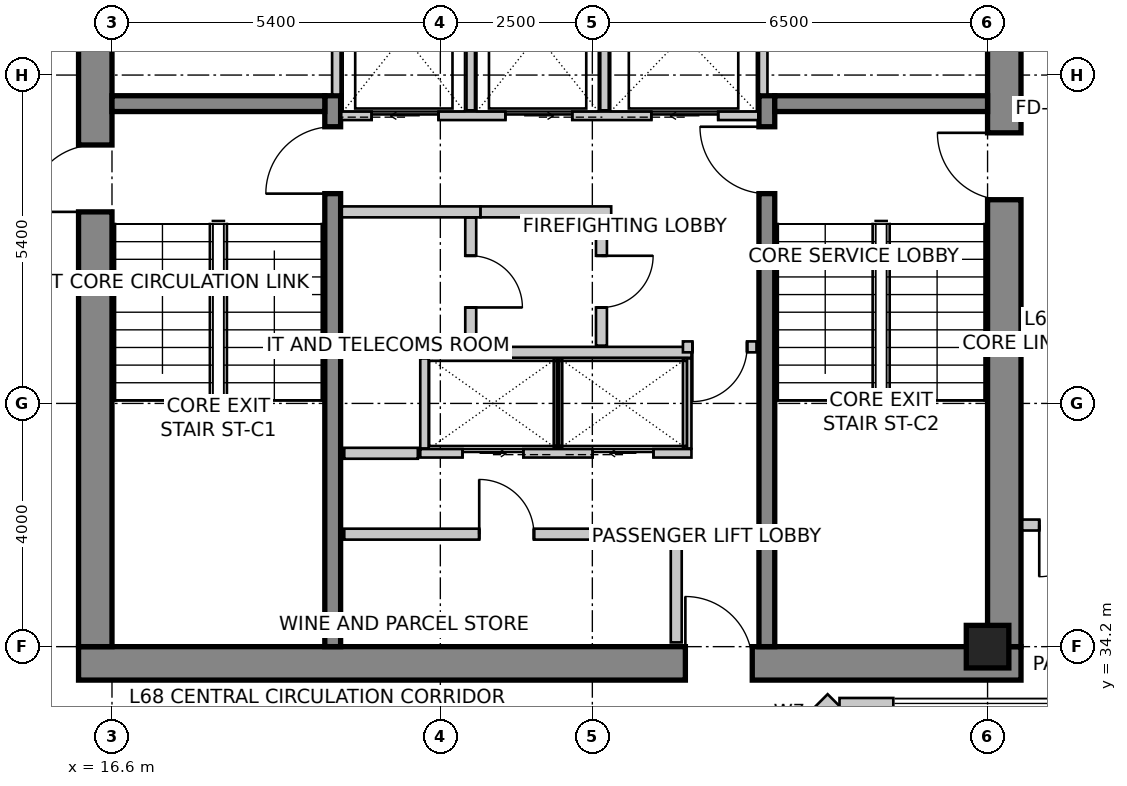
"""IFC4 building model, lengths in metres.
Left out: names, types, materials, properties, quantities, classifications, styles, units other than length and angle.
Written with IfcOpenShell. Run it as: python <this file> out.ifc"""

import sys

from ifc_helpers import new_model, si_unit, direction, frame, frame_2d, origin, origin_2d, place, context, subcontext, project, spatial, rectangle, extrude, source, transform, mapped, element, fill, save


model = new_model("IFC4")
c1 = context("Model", 3, precision=1e-05, world=origin(), true_north=direction((0.0, 1.0)))
c2 = subcontext(c1, "Body", "Model", "MODEL_VIEW")
j1 = project(units=[si_unit("LENGTHUNIT", "METRE"), si_unit("PLANEANGLEUNIT", "RADIAN")], contexts=[c1])
p1 = place(None, origin())
s1 = spatial("IfcSite", under=j1, at=p1, CompositionType="ELEMENT")
p2 = place(p1, origin())
s2 = spatial("IfcBuilding", under=s1, at=p2, CompositionType="ELEMENT")
p3 = place(p2, frame((0.0, 0.0, 267.3)))
s3 = spatial("IfcBuildingStorey", under=s2, at=p3, CompositionType="ELEMENT", Elevation=267.3)
p4 = place(p3, frame((16.05, 33.925, 0.0), z_axis=(0.0, 0.0, 1.0), x_axis=(1.0, 0.0, 0.0)))
e1 = element("IfcWall", 1, at=p4, inside=s3, PredefinedType="SHEAR", context=c2, shape_type="SweptSolid", body=[
    extrude(rectangle(XDim=15.5, YDim=0.55, at=frame_2d((7.75, 0.0))), origin(), (0.0, 0.0, 1.0), 3.6),
])
m1 = source(origin(), c2, "Body", "SweptSolid", [
    extrude(rectangle(XDim=1.1, YDim=2.15, at=frame_2d((0.55, 1.075))), frame((0.0, 0.285, 0.0), z_axis=(0.0, -1.0, 0.0), x_axis=(1.0, 0.0, 0.0)), (0.0, 0.0, 1.0), 0.57),
])
p5 = place(p4, frame((9.98, 0.0, 0.0)))
e2 = element("IfcOpeningElement", 2, at=p5, cuts=e1, PredefinedType="OPENING", context=c2, shape_type="MappedRepresentation", body=[
    mapped(m1, transform((0.0, 0.0, 0.0), scale=1.0)),
])
p6 = place(p3, frame((16.325, 34.2, 0.0), z_axis=(0.0, 0.0, 1.0), x_axis=(0.0, 1.0, 0.0)))
e3 = element("IfcWall", 3, at=p6, inside=s3, PredefinedType="SHEAR", context=c2, shape_type="SweptSolid", body=[
    extrude(rectangle(XDim=11.4, YDim=0.55, at=frame_2d((5.7, 0.0))), origin(), (0.0, 0.0, 1.0), 3.6),
])
p7 = place(p6, frame((7.15, 0.0, 0.0)))
e4 = element("IfcOpeningElement", 4, at=p7, cuts=e3, PredefinedType="OPENING", context=c2, shape_type="MappedRepresentation", body=[
    mapped(m1, transform((0.0, 0.0, 0.0), scale=1.0)),
])
p8 = place(p3, frame((31.275, 34.2, 0.0), z_axis=(0.0, 0.0, 1.0), x_axis=(0.0, 1.0, 0.0)))
e5 = element("IfcWall", 5, at=p8, inside=s3, PredefinedType="SHEAR", context=c2, shape_type="SweptSolid", body=[
    extrude(rectangle(XDim=11.4, YDim=0.55, at=frame_2d((5.7, 0.0))), origin(), (0.0, 0.0, 1.0), 3.6),
])
p9 = place(p8, frame((7.35, 0.0, 0.0)))
e6 = element("IfcOpeningElement", 6, at=p9, cuts=e5, PredefinedType="OPENING", context=c2, shape_type="MappedRepresentation", body=[
    mapped(m1, transform((0.0, 0.0, 0.0), scale=1.0)),
])
p10 = place(p3, frame((20.23, 34.2, 0.0), z_axis=(0.0, 0.0, 1.0), x_axis=(0.0, 1.0, 0.0)))
e7 = element("IfcWall", 7, at=p10, inside=s3, PredefinedType="SHEAR", context=c2, shape_type="SweptSolid", body=[
    extrude(rectangle(XDim=9.06, YDim=0.26, at=frame_2d((4.53, 0.0))), origin(), (0.0, 0.0, 1.0), 3.6),
])
m2 = source(origin(), c2, "Body", "SweptSolid", [
    extrude(rectangle(XDim=1.1, YDim=2.15, at=frame_2d((0.55, 1.075))), frame((0.0, 0.14, 0.0), z_axis=(0.0, -1.0, 0.0), x_axis=(1.0, 0.0, 0.0)), (0.0, 0.0, 1.0), 0.28),
])
p11 = place(p10, frame((7.45, 0.0, 0.0)))
e8 = element("IfcOpeningElement", 8, at=p11, cuts=e7, PredefinedType="OPENING", context=c2, shape_type="MappedRepresentation", body=[
    mapped(m2, transform((0.0, 0.0, 0.0), scale=1.0)),
])
p12 = place(p3, frame((27.37, 34.2, 0.0), z_axis=(0.0, 0.0, 1.0), x_axis=(0.0, 1.0, 0.0)))
e9 = element("IfcWall", 9, at=p12, inside=s3, PredefinedType="SHEAR", context=c2, shape_type="SweptSolid", body=[
    extrude(rectangle(XDim=9.06, YDim=0.26, at=frame_2d((4.53, 0.0))), origin(), (0.0, 0.0, 1.0), 3.6),
])
p13 = place(p12, frame((7.45, 0.0, 0.0)))
e10 = element("IfcOpeningElement", 10, at=p13, cuts=e9, PredefinedType="OPENING", context=c2, shape_type="MappedRepresentation", body=[
    mapped(m2, transform((0.0, 0.0, 0.0), scale=1.0)),
])
for number, where, z_axis, x_axis in (
    (11, (16.6, 43.13, 0.0), (0.0, 0.0, 1.0), (1.0, 0.0, 0.0)),
    (12, (27.5, 43.13, 0.0), (0.0, 0.0, 1.0), (1.0, 0.0, 0.0)),
):
    element("IfcWall", number, at=place(p3, frame(where, z_axis=z_axis, x_axis=x_axis)), inside=s3, PredefinedType="SHEAR", context=c2, shape_type="SweptSolid", body=[
        extrude(rectangle(XDim=3.5, YDim=0.26, at=frame_2d((1.75, 0.0))), origin(), (0.0, 0.0, 1.0), 3.6),
    ])
m3 = source(origin(), c2, "Body", "SweptSolid", [
    extrude(rectangle(XDim=0.7, YDim=0.7, at=origin_2d()), origin(), (0.0, 0.0, 1.0), 3.6),
])
p14 = place(p3, frame((31.0, 34.2, 0.0), z_axis=(0.0, 0.0, 1.0), x_axis=(1.0, 0.0, 0.0)))
e13 = element("IfcColumn", 13, at=p14, inside=s3, PredefinedType="COLUMN", context=c2, shape_type="MappedRepresentation", body=[
    mapped(m3, transform((0.0, 0.0, 0.0), scale=1.0)),
])
p15 = place(p3, frame((26.42, 31.256, 0.0), z_axis=(0.0, 0.0, 1.0), x_axis=(0.707106781187, 0.707106781187, 0.0)))
e14 = element("IfcWall", 14, at=p15, inside=s3, PredefinedType="SOLIDWALL", context=c2, shape_type="SweptSolid", body=[
    extrude(rectangle(XDim=2.907, YDim=0.3, at=frame_2d((1.454, 0.0))), origin(), (0.0, 0.0, 1.0), 3.35),
])
m4 = source(origin(), c2, "Body", "SweptSolid", [
    extrude(rectangle(XDim=0.9, YDim=1.6, at=frame_2d((0.45, 0.8))), frame((0.0, 0.16, 0.0), z_axis=(0.0, -1.0, 0.0), x_axis=(1.0, 0.0, 0.0)), (0.0, 0.0, 1.0), 0.32),
])
p16 = place(p15, frame((1.422, 0.0, 0.85)))
e15 = element("IfcOpeningElement", 15, at=p16, cuts=e14, PredefinedType="OPENING", context=c2, shape_type="MappedRepresentation", body=[
    mapped(m4, transform((0.0, 0.0, 0.0), scale=1.0)),
])
p17 = place(p3, frame((28.565, 33.206, 0.0), z_axis=(0.0, 0.0, 1.0), x_axis=(1.0, 0.0, 0.0)))
e16 = element("IfcWall", 16, at=p17, inside=s3, PredefinedType="SOLIDWALL", context=c2, shape_type="SweptSolid", body=[
    extrude(rectangle(XDim=0.885, YDim=0.3, at=frame_2d((0.442, 0.0))), origin(), (0.0, 0.0, 1.0), 3.35),
])
p18 = place(p3, frame((20.37, 42.93, 0.0), z_axis=(0.0, 0.0, 1.0), x_axis=(1.0, 0.0, 0.0)))
e17 = element("IfcWall", 17, at=p18, inside=s3, PredefinedType="SOLIDWALL", context=c2, shape_type="SweptSolid", body=[
    extrude(rectangle(XDim=6.86, YDim=0.14, at=frame_2d((3.43, 0.0))), origin(), (0.0, 0.0, 1.0), 3.35),
])
m5 = source(origin(), c2, "Body", "SweptSolid", [
    extrude(rectangle(XDim=1.1, YDim=2.15, at=frame_2d((0.55, 1.075))), frame((0.0, 0.08, 0.0), z_axis=(0.0, -1.0, 0.0), x_axis=(1.0, 0.0, 0.0)), (0.0, 0.0, 1.0), 0.16),
])
p19 = place(p18, frame((0.5, 0.0, 0.0)))
e18 = element("IfcOpeningElement", 18, at=p19, cuts=e17, PredefinedType="OPENING", context=c2, shape_type="MappedRepresentation", body=[
    mapped(m5, transform((0.0, 0.0, 0.0), scale=1.0)),
])
p20 = place(p18, frame((2.7, 0.0, 0.0)))
e19 = element("IfcOpeningElement", 19, at=p20, cuts=e17, PredefinedType="OPENING", context=c2, shape_type="MappedRepresentation", body=[
    mapped(m5, transform((0.0, 0.0, 0.0), scale=1.0)),
])
p21 = place(p18, frame((5.1, 0.0, 0.0)))
e20 = element("IfcOpeningElement", 20, at=p21, cuts=e17, PredefinedType="OPENING", context=c2, shape_type="MappedRepresentation", body=[
    mapped(m5, transform((0.0, 0.0, 0.0), scale=1.0)),
])
for number, where, z_axis, x_axis in (
    (21, (20.29, 43.28, 0.0), (0.0, 0.0, 1.0), (0.0, 1.0, 0.0)),
    (22, (27.31, 43.28, 0.0), (0.0, 0.0, 1.0), (0.0, 1.0, 0.0)),
):
    element("IfcWall", number, at=place(p3, frame(where, z_axis=z_axis, x_axis=x_axis)), inside=s3, PredefinedType="SOLIDWALL", context=c2, shape_type="SweptSolid", body=[
        extrude(rectangle(XDim=2.3, YDim=0.14, at=frame_2d((1.15, 0.0))), origin(), (0.0, 0.0, 1.0), 3.35),
    ])
for number, where, z_axis, x_axis in (
    (23, (22.5, 43.02, 0.0), (0.0, 0.0, 1.0), (0.0, 1.0, 0.0)),
    (24, (24.7, 43.02, 0.0), (0.0, 0.0, 1.0), (0.0, 1.0, 0.0)),
):
    element("IfcWall", number, at=place(p3, frame(where, z_axis=z_axis, x_axis=x_axis)), inside=s3, PredefinedType="SOLIDWALL", context=c2, shape_type="SweptSolid", body=[
        extrude(rectangle(XDim=2.56, YDim=0.14, at=frame_2d((1.28, 0.0))), origin(), (0.0, 0.0, 1.0), 3.35),
    ])
p22 = place(p3, frame((21.67, 37.38, 0.0), z_axis=(0.0, 0.0, 1.0), x_axis=(1.0, 0.0, 0.0)))
e25 = element("IfcWall", 25, at=p22, inside=s3, PredefinedType="SOLIDWALL", context=c2, shape_type="SweptSolid", body=[
    extrude(rectangle(XDim=4.46, YDim=0.14, at=frame_2d((2.23, 0.0))), origin(), (0.0, 0.0, 1.0), 3.35),
])
m6 = source(origin(), c2, "Body", "SweptSolid", [
    extrude(rectangle(XDim=1.0, YDim=2.15, at=frame_2d((0.5, 1.075))), frame((0.0, 0.08, 0.0), z_axis=(0.0, -1.0, 0.0), x_axis=(1.0, 0.0, 0.0)), (0.0, 0.0, 1.0), 0.16),
])
p23 = place(p22, frame((0.695, 0.0, 0.0)))
e26 = element("IfcOpeningElement", 26, at=p23, cuts=e25, PredefinedType="OPENING", context=c2, shape_type="MappedRepresentation", body=[
    mapped(m6, transform((0.0, 0.0, 0.0), scale=1.0)),
])
p24 = place(p22, frame((2.835, 0.0, 0.0)))
e27 = element("IfcOpeningElement", 27, at=p24, cuts=e25, PredefinedType="OPENING", context=c2, shape_type="MappedRepresentation", body=[
    mapped(m6, transform((0.0, 0.0, 0.0), scale=1.0)),
])
p25 = place(p3, frame((21.67, 39.04, 0.0), z_axis=(0.0, 0.0, 1.0), x_axis=(1.0, 0.0, 0.0)))
e28 = element("IfcWall", 28, at=p25, inside=s3, PredefinedType="SOLIDWALL", context=c2, shape_type="SweptSolid", body=[
    extrude(rectangle(XDim=4.46, YDim=0.18, at=frame_2d((2.23, 0.0))), origin(), (0.0, 0.0, 1.0), 3.35),
])
for number, where, z_axis, x_axis in (
    (29, (26.06, 37.46, 0.0), (0.0, 0.0, 1.0), (0.0, 1.0, 0.0)),
    (30, (21.74, 37.46, 0.0), (0.0, 0.0, 1.0), (0.0, 1.0, 0.0)),
    (31, (23.935, 37.46, 0.0), (0.0, 0.0, 1.0), (0.0, 1.0, 0.0)),
):
    element("IfcWall", number, at=place(p3, frame(where, z_axis=z_axis, x_axis=x_axis)), inside=s3, PredefinedType="SOLIDWALL", context=c2, shape_type="SweptSolid", body=[
        extrude(rectangle(XDim=1.48, YDim=0.14, at=frame_2d((0.74, 0.0))), origin(), (0.0, 0.0, 1.0), 3.35),
    ])
p26 = place(p3, frame((22.66, 41.35, 0.0), z_axis=(0.0, 0.0, 1.0), x_axis=(-1.0, 0.0, 0.0)))
e32 = element("IfcWall", 32, at=p26, inside=s3, PredefinedType="PARTITIONING", context=c2, shape_type="SweptSolid", body=[
    extrude(rectangle(XDim=2.28, YDim=0.18, at=frame_2d((1.14, 0.0))), origin(), (0.0, 0.0, 1.0), 3.35),
])
p27 = place(p3, frame((24.81, 41.35, 0.0), z_axis=(0.0, 0.0, 1.0), x_axis=(-1.0, 0.0, 0.0)))
e33 = element("IfcWall", 33, at=p27, inside=s3, PredefinedType="PARTITIONING", context=c2, shape_type="SweptSolid", body=[
    extrude(rectangle(XDim=2.148, YDim=0.18, at=frame_2d((1.074, 0.0))), origin(), (0.0, 0.0, 1.0), 3.35),
])
p28 = place(p3, frame((22.5, 41.256, 0.0), z_axis=(0.0, 0.0, 1.0), x_axis=(0.0, -1.0, 0.0)))
e34 = element("IfcWall", 34, at=p28, inside=s3, PredefinedType="PARTITIONING", context=c2, shape_type="SweptSolid", body=[
    extrude(rectangle(XDim=2.106, YDim=0.18, at=frame_2d((1.053, 0.0))), origin(), (0.0, 0.0, 1.0), 3.35),
])
m7 = source(origin(), c2, "Body", "SweptSolid", [
    extrude(rectangle(XDim=0.85, YDim=2.15, at=frame_2d((0.425, 1.075))), frame((0.0, 0.1, 0.0), z_axis=(0.0, -1.0, 0.0), x_axis=(1.0, 0.0, 0.0)), (0.0, 0.0, 1.0), 0.2),
])
p29 = place(p28, frame((0.628, 0.0, 0.0)))
e35 = element("IfcOpeningElement", 35, at=p29, cuts=e34, PredefinedType="OPENING", context=c2, shape_type="MappedRepresentation", body=[
    mapped(m7, transform((0.0, 0.0, 0.0), scale=1.0)),
])
p30 = place(p3, frame((21.63, 37.38, 0.0), z_axis=(0.0, 0.0, 1.0), x_axis=(-1.0, 0.0, 0.0)))
e36 = element("IfcWall", 36, at=p30, inside=s3, PredefinedType="PARTITIONING", context=c2, shape_type="SweptSolid", body=[
    extrude(rectangle(XDim=1.21, YDim=0.18, at=frame_2d((0.605, 0.0))), origin(), (0.0, 0.0, 1.0), 3.35),
])
p31 = place(p3, frame((24.65, 41.256, 0.0), z_axis=(0.0, 0.0, 1.0), x_axis=(0.0, -1.0, 0.0)))
e37 = element("IfcWall", 37, at=p31, inside=s3, PredefinedType="PARTITIONING", context=c2, shape_type="SweptSolid", body=[
    extrude(rectangle(XDim=2.106, YDim=0.18, at=frame_2d((1.053, 0.0))), origin(), (0.0, 0.0, 1.0), 3.35),
])
p32 = place(p31, frame((0.628, 0.0, 0.0)))
e38 = element("IfcOpeningElement", 38, at=p32, cuts=e37, PredefinedType="OPENING", context=c2, shape_type="MappedRepresentation", body=[
    mapped(m7, transform((0.0, 0.0, 0.0), scale=1.0)),
])
p33 = place(p3, frame((27.2, 39.13, 0.0), z_axis=(0.0, 0.0, 1.0), x_axis=(-1.0, 0.0, 0.0)))
e39 = element("IfcWall", 39, at=p33, inside=s3, PredefinedType="PARTITIONING", context=c2, shape_type="SweptSolid", body=[
    extrude(rectangle(XDim=1.21, YDim=0.18, at=frame_2d((0.605, 0.0))), origin(), (0.0, 0.0, 1.0), 3.35),
])
m8 = source(origin(), c2, "Body", "SweptSolid", [
    extrude(rectangle(XDim=0.9, YDim=2.15, at=frame_2d((0.45, 1.075))), frame((0.0, 0.1, 0.0), z_axis=(0.0, -1.0, 0.0), x_axis=(1.0, 0.0, 0.0)), (0.0, 0.0, 1.0), 0.2),
])
p34 = place(p33, frame((0.155, 0.0, 0.0)))
e40 = element("IfcOpeningElement", 40, at=p34, cuts=e39, PredefinedType="OPENING", context=c2, shape_type="MappedRepresentation", body=[
    mapped(m8, transform((0.0, 0.0, 0.0), scale=1.0)),
])
p35 = place(p3, frame((20.42, 36.05, 0.0), z_axis=(0.0, 0.0, 1.0), x_axis=(1.0, 0.0, 0.0)))
e41 = element("IfcWall", 41, at=p35, inside=s3, PredefinedType="PARTITIONING", context=c2, shape_type="SweptSolid", body=[
    extrude(rectangle(XDim=5.46, YDim=0.18, at=frame_2d((2.73, 0.0))), origin(), (0.0, 0.0, 1.0), 3.35),
])
p36 = place(p35, frame((2.219, 0.0, 0.0)))
e42 = element("IfcOpeningElement", 42, at=p36, cuts=e41, PredefinedType="OPENING", context=c2, shape_type="MappedRepresentation", body=[
    mapped(m8, transform((0.0, 0.0, 0.0), scale=1.0)),
])
p37 = place(p3, frame((25.88, 35.956, 0.0), z_axis=(0.0, 0.0, 1.0), x_axis=(0.0, -1.0, 0.0)))
e43 = element("IfcWall", 43, at=p37, inside=s3, PredefinedType="PARTITIONING", context=c2, shape_type="SweptSolid", body=[
    extrude(rectangle(XDim=1.686, YDim=0.18, at=frame_2d((0.843, 0.0))), origin(), (0.0, 0.0, 1.0), 2.642),
])
p38 = place(p3, frame((33.15, 36.2, 0.0), z_axis=(0.0, 0.0, 1.0), x_axis=(-1.0, 0.0, 0.0)))
e44 = element("IfcWall", 44, at=p38, inside=s3, PredefinedType="PARTITIONING", context=c2, shape_type="SweptSolid", body=[
    extrude(rectangle(XDim=1.58, YDim=0.18, at=frame_2d((0.79, 0.0))), origin(), (0.0, 0.0, 1.0), 3.35),
])
p39 = place(p38, frame((0.45, 0.0, 0.0)))
e45 = element("IfcOpeningElement", 45, at=p39, cuts=e44, PredefinedType="OPENING", context=c2, shape_type="MappedRepresentation", body=[
    mapped(m7, transform((0.0, 0.0, 0.0), scale=1.0)),
])
m9 = source(origin(), c2, "Body", "SweptSolid", [
    extrude(rectangle(XDim=1.1, YDim=2.15, at=frame_2d((0.55, 1.075))), frame((0.0, 0.025, 0.0), z_axis=(0.0, -1.0, 0.0), x_axis=(1.0, 0.0, 0.0)), (0.0, 0.0, 1.0), 0.05),
])
p40 = place(p19, origin())
e46 = element("IfcDoor", 46, at=p40, inside=s3, OperationType="SLIDING_TO_LEFT", PredefinedType="DOOR", context=c2, shape_type="MappedRepresentation", body=[
    mapped(m9, transform((0.0, 0.0, 0.0), scale=1.0)),
])
fill(e18, e46)
p41 = place(p20, origin())
e47 = element("IfcDoor", 47, at=p41, inside=s3, OperationType="SLIDING_TO_RIGHT", PredefinedType="DOOR", context=c2, shape_type="MappedRepresentation", body=[
    mapped(m9, transform((0.0, 0.0, 0.0), scale=1.0)),
])
fill(e19, e47)
m10 = source(origin(), c2, "Body", "SweptSolid", [
    extrude(rectangle(XDim=1.1, YDim=2.15, at=frame_2d((0.55, 1.075))), frame((0.0, 0.025, 0.0), z_axis=(0.0, -1.0, 0.0), x_axis=(1.0, 0.0, 0.0)), (0.0, 0.0, 1.0), 0.05),
])
p42 = place(p21, origin())
e48 = element("IfcDoor", 48, at=p42, inside=s3, OperationType="SLIDING_TO_LEFT", PredefinedType="DOOR", context=c2, shape_type="MappedRepresentation", body=[
    mapped(m10, transform((0.0, 0.0, 0.0), scale=1.0)),
])
fill(e20, e48)
m11 = source(origin(), c2, "Body", "SweptSolid", [
    extrude(rectangle(XDim=1.0, YDim=2.15, at=frame_2d((0.5, 1.075))), frame((0.0, 0.025, 0.0), z_axis=(0.0, -1.0, 0.0), x_axis=(1.0, 0.0, 0.0)), (0.0, 0.0, 1.0), 0.05),
])
p43 = place(p23, origin())
e49 = element("IfcDoor", 49, at=p43, inside=s3, OperationType="SLIDING_TO_RIGHT", PredefinedType="DOOR", context=c2, shape_type="MappedRepresentation", body=[
    mapped(m11, transform((0.0, 0.0, 0.0), scale=1.0)),
])
fill(e26, e49)
p44 = place(p24, origin())
e50 = element("IfcDoor", 50, at=p44, inside=s3, OperationType="SLIDING_TO_LEFT", PredefinedType="DOOR", context=c2, shape_type="MappedRepresentation", body=[
    mapped(m11, transform((0.0, 0.0, 0.0), scale=1.0)),
])
fill(e27, e50)
m12 = source(origin(), c2, "Body", "SweptSolid", [
    extrude(rectangle(XDim=1.1, YDim=2.15, at=frame_2d((0.55, 1.075))), frame((0.0, 0.025, 0.0), z_axis=(0.0, -1.0, 0.0), x_axis=(1.0, 0.0, 0.0)), (0.0, 0.0, 1.0), 0.05),
])
p45 = place(p11, origin())
e51 = element("IfcDoor", 51, at=p45, inside=s3, OperationType="SINGLE_SWING_LEFT", PredefinedType="DOOR", context=c2, shape_type="MappedRepresentation", body=[
    mapped(m12, transform((0.0, 0.0, 0.0), scale=1.0)),
])
fill(e8, e51)
p46 = place(p13, origin())
e52 = element("IfcDoor", 52, at=p46, inside=s3, OperationType="SINGLE_SWING_RIGHT", PredefinedType="DOOR", context=c2, shape_type="MappedRepresentation", body=[
    mapped(m12, transform((0.0, 0.0, 0.0), scale=1.0)),
])
fill(e10, e52)
p47 = place(p7, origin())
e53 = element("IfcDoor", 53, at=p47, inside=s3, OperationType="SINGLE_SWING_LEFT", PredefinedType="DOOR", context=c2, shape_type="MappedRepresentation", body=[
    mapped(m12, transform((0.0, 0.0, 0.0), scale=1.0)),
])
fill(e4, e53)
p48 = place(p9, origin())
e54 = element("IfcDoor", 54, at=p48, inside=s3, OperationType="SINGLE_SWING_RIGHT", PredefinedType="DOOR", context=c2, shape_type="MappedRepresentation", body=[
    mapped(m12, transform((0.0, 0.0, 0.0), scale=1.0)),
])
fill(e6, e54)
p49 = place(p5, origin())
e55 = element("IfcDoor", 55, at=p49, inside=s3, OperationType="SINGLE_SWING_LEFT", PredefinedType="DOOR", context=c2, shape_type="MappedRepresentation", body=[
    mapped(m12, transform((0.0, 0.0, 0.0), scale=1.0)),
])
fill(e2, e55)
m13 = source(origin(), c2, "Body", "SweptSolid", [
    extrude(rectangle(XDim=0.85, YDim=2.15, at=frame_2d((0.425, 1.075))), frame((0.0, 0.025, 0.0), z_axis=(0.0, -1.0, 0.0), x_axis=(1.0, 0.0, 0.0)), (0.0, 0.0, 1.0), 0.05),
])
p50 = place(p29, origin())
e56 = element("IfcDoor", 56, at=p50, inside=s3, OperationType="SINGLE_SWING_RIGHT", PredefinedType="DOOR", context=c2, shape_type="MappedRepresentation", body=[
    mapped(m13, transform((0.0, 0.0, 0.0), scale=1.0)),
])
fill(e35, e56)
p51 = place(p32, origin())
e57 = element("IfcDoor", 57, at=p51, inside=s3, OperationType="SINGLE_SWING_LEFT", PredefinedType="DOOR", context=c2, shape_type="MappedRepresentation", body=[
    mapped(m13, transform((0.0, 0.0, 0.0), scale=1.0)),
])
fill(e38, e57)
m14 = source(origin(), c2, "Body", "SweptSolid", [
    extrude(rectangle(XDim=0.9, YDim=2.15, at=frame_2d((0.45, 1.075))), frame((0.0, 0.025, 0.0), z_axis=(0.0, -1.0, 0.0), x_axis=(1.0, 0.0, 0.0)), (0.0, 0.0, 1.0), 0.05),
])
p52 = place(p34, origin())
e58 = element("IfcDoor", 58, at=p52, inside=s3, OperationType="SINGLE_SWING_RIGHT", PredefinedType="DOOR", context=c2, shape_type="MappedRepresentation", body=[
    mapped(m14, transform((0.0, 0.0, 0.0), scale=1.0)),
])
fill(e40, e58)
p53 = place(p36, origin())
e59 = element("IfcDoor", 59, at=p53, inside=s3, OperationType="SINGLE_SWING_LEFT", PredefinedType="DOOR", context=c2, shape_type="MappedRepresentation", body=[
    mapped(m14, transform((0.0, 0.0, 0.0), scale=1.0)),
])
fill(e42, e59)
m15 = source(origin(), c2, "Body", "SweptSolid", [
    extrude(rectangle(XDim=0.85, YDim=2.15, at=frame_2d((0.425, 1.075))), frame((0.0, 0.025, 0.0), z_axis=(0.0, -1.0, 0.0), x_axis=(1.0, 0.0, 0.0)), (0.0, 0.0, 1.0), 0.05),
])
p54 = place(p39, origin())
e60 = element("IfcDoor", 60, at=p54, inside=s3, OperationType="SINGLE_SWING_RIGHT", PredefinedType="DOOR", context=c2, shape_type="MappedRepresentation", body=[
    mapped(m15, transform((0.0, 0.0, 0.0), scale=1.0)),
])
fill(e45, e60)
save(model, sys.argv[1])
